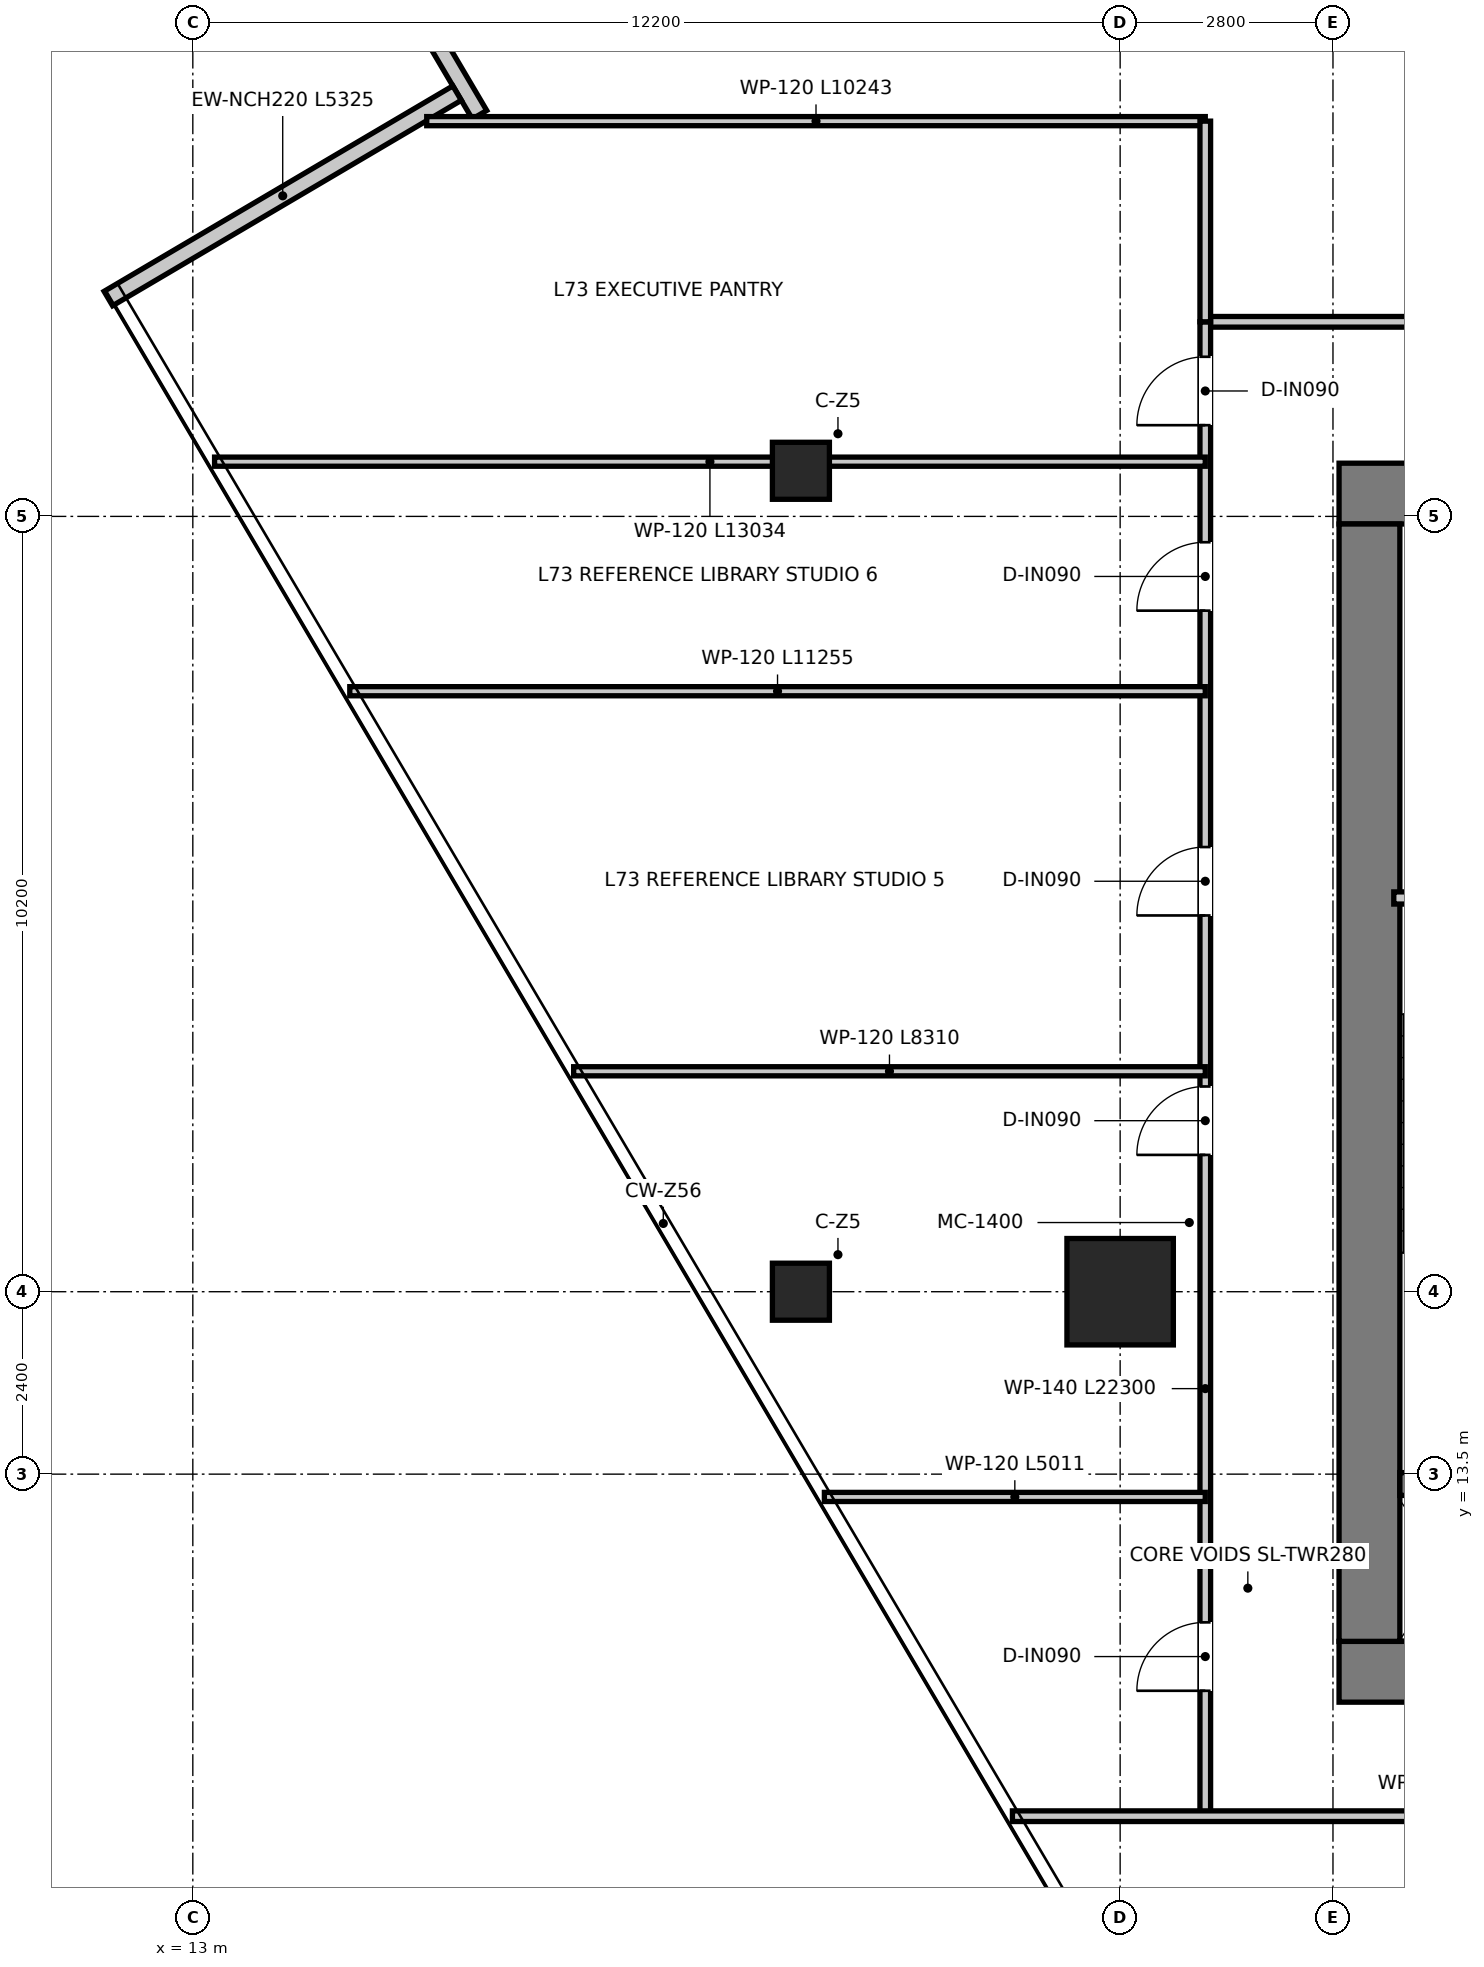
"""IFC4 building model, lengths in metres.
Left out: names, types, materials, properties, quantities, classifications, styles, units other than length and angle.
Written with IfcOpenShell. Run it as: python <this file> out.ifc"""

import sys

from ifc_helpers import new_model, si_unit, direction, frame, frame_2d, origin, origin_2d, place, context, subcontext, project, spatial, rectangle, extrude, source, transform, mapped, element, fill, save


model = new_model("IFC4")
c1 = context("Model", 3, precision=1e-05, world=origin(), true_north=direction((0.0, 1.0)))
c2 = subcontext(c1, "Body", "Model", "MODEL_VIEW")
j1 = project(units=[si_unit("LENGTHUNIT", "METRE"), si_unit("PLANEANGLEUNIT", "RADIAN")], contexts=[c1])
p1 = place(None, origin())
s1 = spatial("IfcSite", under=j1, at=p1, CompositionType="ELEMENT")
p2 = place(p1, origin())
s2 = spatial("IfcBuilding", under=s1, at=p2, CompositionType="ELEMENT")
p3 = place(p2, frame((0.0, 0.0, 299.0)))
s3 = spatial("IfcBuildingStorey", under=s2, at=p3, CompositionType="ELEMENT", Elevation=299.0)
p4 = place(p3, frame((28.08, 10.9, 0.0), z_axis=(0.0, 0.0, 1.0), x_axis=(1.0, 0.0, 0.0)))
e1 = element("IfcWall", 1, at=p4, inside=s3, PredefinedType="SHEAR", context=c2, shape_type="SweptSolid", body=[
    extrude(rectangle(XDim=15.84, YDim=0.8, at=frame_2d((7.92, 0.0))), origin(), (0.0, 0.0, 1.0), 3.95),
])
p5 = place(p3, frame((28.08, 26.4, 0.0), z_axis=(0.0, 0.0, 1.0), x_axis=(1.0, 0.0, 0.0)))
e2 = element("IfcWall", 2, at=p5, inside=s3, PredefinedType="SHEAR", context=c2, shape_type="SweptSolid", body=[
    extrude(rectangle(XDim=15.84, YDim=0.8, at=frame_2d((7.92, 0.0))), origin(), (0.0, 0.0, 1.0), 3.95),
])
p6 = place(p5, frame((7.22, 0.0, 0.0)))
e3 = element("IfcOpeningElement", 3, at=p6, cuts=e2, PredefinedType="OPENING", context=c2, shape_type="SweptSolid", body=[
    extrude(rectangle(XDim=1.4, YDim=2.2, at=frame_2d((0.7, 1.1))), frame((0.0, 0.41, 0.0), z_axis=(0.0, -1.0, 0.0), x_axis=(1.0, 0.0, 0.0)), (0.0, 0.0, 1.0), 0.82),
])
p7 = place(p5, frame((1.775, 0.0, 0.0)))
e4 = element("IfcOpeningElement", 4, at=p7, cuts=e2, PredefinedType="OPENING", context=c2, shape_type="SweptSolid", body=[
    extrude(rectangle(XDim=1.05, YDim=2.1, at=frame_2d((0.525, 1.05))), frame((0.0, 0.41, 0.0), z_axis=(0.0, -1.0, 0.0), x_axis=(1.0, 0.0, 0.0)), (0.0, 0.0, 1.0), 0.82),
])
p8 = place(p5, frame((13.015, 0.0, 0.0)))
e5 = element("IfcOpeningElement", 5, at=p8, cuts=e2, PredefinedType="OPENING", context=c2, shape_type="SweptSolid", body=[
    extrude(rectangle(XDim=1.05, YDim=2.1, at=frame_2d((0.525, 1.05))), frame((0.0, 0.41, 0.0), z_axis=(0.0, -1.0, 0.0), x_axis=(1.0, 0.0, 0.0)), (0.0, 0.0, 1.0), 0.82),
])
p9 = place(p3, frame((28.48, 11.3, 0.0), z_axis=(0.0, 0.0, 1.0), x_axis=(0.0, 1.0, 0.0)))
e6 = element("IfcWall", 6, at=p9, inside=s3, PredefinedType="SHEAR", context=c2, shape_type="SweptSolid", body=[
    extrude(rectangle(XDim=14.7, YDim=0.8, at=frame_2d((7.35, 0.0))), origin(), (0.0, 0.0, 1.0), 3.95),
])
p10 = place(p3, frame((28.88, 13.37, 0.0), z_axis=(0.0, 0.0, 1.0), x_axis=(1.0, 0.0, 0.0)))
e7 = element("IfcWall", 7, at=p10, inside=s3, PredefinedType="SHEAR", context=c2, shape_type="SweptSolid", body=[
    extrude(rectangle(XDim=3.1, YDim=0.3, at=frame_2d((1.55, 0.0))), origin(), (0.0, 0.0, 1.0), 3.95),
])
m1 = source(origin(), c2, "Body", "SweptSolid", [
    extrude(rectangle(XDim=1.4, YDim=1.4, at=origin_2d()), origin(), (0.0, 0.0, 1.0), 3.95),
])
p11 = place(p3, frame((25.2, 15.9, 0.0), z_axis=(0.0, 0.0, 1.0), x_axis=(1.0, 0.0, 0.0)))
e8 = element("IfcColumn", 8, at=p11, inside=s3, PredefinedType="USERDEFINED", context=c2, shape_type="MappedRepresentation", body=[
    mapped(m1, transform((0.0, 0.0, 0.0), x_axis=(1.0, 0.0, 0.0), y_axis=(0.0, 1.0, 0.0), z_axis=(0.0, 0.0, 1.0), scale=1.0)),
])
m2 = source(origin(), c2, "Body", "SweptSolid", [
    extrude(rectangle(XDim=0.75, YDim=0.75, at=origin_2d()), origin(), (0.0, 0.0, 1.0), 3.95),
])
for number, where, z_axis, x_axis in (
    (9, (21.0, 15.9, 0.0), (0.0, 0.0, 1.0), (1.0, 0.0, 0.0)),
    (10, (21.0, 26.7, 0.0), (0.0, 0.0, 1.0), (1.0, 0.0, 0.0)),
):
    element("IfcColumn", number, at=place(p3, frame(where, z_axis=z_axis, x_axis=x_axis)), inside=s3, PredefinedType="COLUMN", context=c2, shape_type="MappedRepresentation", body=[
        mapped(m2, transform((0.0, 0.0, 0.0), x_axis=(1.0, 0.0, 0.0), y_axis=(0.0, 1.0, 0.0), z_axis=(0.0, 0.0, 1.0), scale=1.0)),
    ])
p12 = place(p3, frame((13.813, 36.407, 0.0), z_axis=(0.0, 0.0, 1.0), x_axis=(0.507550761113, -0.861621857252, 0.0)))
e11 = element("IfcWall", 11, at=p12, inside=s3, PredefinedType="ELEMENTEDWALL", context=c2, shape_type="SweptSolid", body=[
    extrude(rectangle(XDim=5.83, YDim=0.22, at=frame_2d((2.915, 0.0))), origin(), (0.0, 0.0, 1.0), 3.67),
])
p13 = place(p3, frame((16.477, 31.669, 0.0), z_axis=(0.0, 0.0, 1.0), x_axis=(-0.861627616465, -0.507540984104, 0.0)))
e12 = element("IfcWall", 12, at=p13, inside=s3, PredefinedType="ELEMENTEDWALL", context=c2, shape_type="SweptSolid", body=[
    extrude(rectangle(XDim=5.325, YDim=0.22, at=frame_2d((2.663, 0.0))), origin(), (0.0, 0.0, 1.0), 3.67),
])
p14 = place(p3, frame((28.8, 21.08, 0.0), z_axis=(0.0, 0.0, 1.0), x_axis=(1.0, 0.0, 0.0)))
e13 = element("IfcWall", 13, at=p14, inside=s3, PredefinedType="PARTITIONING", context=c2, shape_type="SweptSolid", body=[
    extrude(rectangle(XDim=3.16, YDim=0.16, at=frame_2d((1.58, 0.0))), origin(), (0.0, 0.0, 1.0), 3.67),
])
p15 = place(p14, frame((1.055, 0.0, 0.0)))
e14 = element("IfcOpeningElement", 14, at=p15, cuts=e13, PredefinedType="OPENING", context=c2, shape_type="SweptSolid", body=[
    extrude(rectangle(XDim=1.05, YDim=2.1, at=frame_2d((0.525, 1.05))), frame((0.0, 0.09, 0.0), z_axis=(0.0, -1.0, 0.0), x_axis=(1.0, 0.0, 0.0)), (0.0, 0.0, 1.0), 0.18),
])
p16 = place(p3, frame((26.32, 28.66, 0.0), z_axis=(0.0, 0.0, 1.0), x_axis=(1.0, 0.0, 0.0)))
e15 = element("IfcWall", 15, at=p16, inside=s3, PredefinedType="PARTITIONING", context=c2, shape_type="SweptSolid", body=[
    extrude(rectangle(XDim=19.36, YDim=0.14, at=frame_2d((9.68, 0.0))), origin(), (0.0, 0.0, 1.0), 3.18),
])
p17 = place(p16, frame((4.265, 0.0, 0.0)))
e16 = element("IfcOpeningElement", 16, at=p17, cuts=e15, PredefinedType="OPENING", context=c2, shape_type="SweptSolid", body=[
    extrude(rectangle(XDim=0.95, YDim=2.1, at=frame_2d((0.475, 1.05))), frame((0.0, 0.08, 0.0), z_axis=(0.0, -1.0, 0.0), x_axis=(1.0, 0.0, 0.0)), (0.0, 0.0, 1.0), 0.16),
])
p18 = place(p16, frame((13.945, 0.0, 0.0)))
e17 = element("IfcOpeningElement", 17, at=p18, cuts=e15, PredefinedType="OPENING", context=c2, shape_type="SweptSolid", body=[
    extrude(rectangle(XDim=0.95, YDim=2.1, at=frame_2d((0.475, 1.05))), frame((0.0, 0.08, 0.0), z_axis=(0.0, -1.0, 0.0), x_axis=(1.0, 0.0, 0.0)), (0.0, 0.0, 1.0), 0.16),
])
p19 = place(p3, frame((26.32, 9.0, 0.0), z_axis=(0.0, 0.0, 1.0), x_axis=(0.0, 1.0, 0.0)))
e18 = element("IfcWall", 18, at=p19, inside=s3, PredefinedType="PARTITIONING", context=c2, shape_type="SweptSolid", body=[
    extrude(rectangle(XDim=19.66, YDim=0.14, at=frame_2d((9.83, 0.0))), origin(), (0.0, 0.0, 1.0), 3.13),
])
p20 = place(p19, frame((18.3, 0.0, 0.0)))
e19 = element("IfcOpeningElement", 19, at=p20, cuts=e18, PredefinedType="OPENING", context=c2, shape_type="SweptSolid", body=[
    extrude(rectangle(XDim=0.9, YDim=2.1, at=frame_2d((0.45, 1.05))), frame((0.0, 0.08, 0.0), z_axis=(0.0, -1.0, 0.0), x_axis=(1.0, 0.0, 0.0)), (0.0, 0.0, 1.0), 0.16),
])
p21 = place(p19, frame((1.65, 0.0, 0.0)))
e20 = element("IfcOpeningElement", 20, at=p21, cuts=e18, PredefinedType="OPENING", context=c2, shape_type="SweptSolid", body=[
    extrude(rectangle(XDim=0.9, YDim=2.1, at=frame_2d((0.45, 1.05))), frame((0.0, 0.08, 0.0), z_axis=(0.0, -1.0, 0.0), x_axis=(1.0, 0.0, 0.0)), (0.0, 0.0, 1.0), 0.16),
])
p22 = place(p19, frame((8.7, 0.0, 0.0)))
e21 = element("IfcOpeningElement", 21, at=p22, cuts=e18, PredefinedType="OPENING", context=c2, shape_type="SweptSolid", body=[
    extrude(rectangle(XDim=0.9, YDim=2.1, at=frame_2d((0.45, 1.05))), frame((0.0, 0.08, 0.0), z_axis=(0.0, -1.0, 0.0), x_axis=(1.0, 0.0, 0.0)), (0.0, 0.0, 1.0), 0.16),
])
p23 = place(p19, frame((11.85, 0.0, 0.0)))
e22 = element("IfcOpeningElement", 22, at=p23, cuts=e18, PredefinedType="OPENING", context=c2, shape_type="SweptSolid", body=[
    extrude(rectangle(XDim=0.9, YDim=2.1, at=frame_2d((0.45, 1.05))), frame((0.0, 0.08, 0.0), z_axis=(0.0, -1.0, 0.0), x_axis=(1.0, 0.0, 0.0)), (0.0, 0.0, 1.0), 0.16),
])
p24 = place(p19, frame((15.86, 0.0, 0.0)))
e23 = element("IfcOpeningElement", 23, at=p24, cuts=e18, PredefinedType="OPENING", context=c2, shape_type="SweptSolid", body=[
    extrude(rectangle(XDim=0.9, YDim=2.1, at=frame_2d((0.45, 1.05))), frame((0.0, 0.08, 0.0), z_axis=(0.0, -1.0, 0.0), x_axis=(1.0, 0.0, 0.0)), (0.0, 0.0, 1.0), 0.16),
])
p25 = place(p3, frame((23.783, 9.0, 0.0), z_axis=(0.0, 0.0, 1.0), x_axis=(1.0, 0.0, 0.0)))
e24 = element("IfcWall", 24, at=p25, inside=s3, PredefinedType="PARTITIONING", context=c2, shape_type="SweptSolid", body=[
    extrude(rectangle(XDim=20.609, YDim=0.14, at=frame_2d((10.304, 0.0))), origin(), (0.0, 0.0, 1.0), 3.67),
])
p26 = place(p25, frame((11.767, 0.0, 0.0)))
e25 = element("IfcOpeningElement", 25, at=p26, cuts=e24, PredefinedType="OPENING", context=c2, shape_type="SweptSolid", body=[
    extrude(rectangle(XDim=0.9, YDim=2.1, at=frame_2d((0.45, 1.05))), frame((0.0, 0.08, 0.0), z_axis=(0.0, -1.0, 0.0), x_axis=(1.0, 0.0, 0.0)), (0.0, 0.0, 1.0), 0.16),
])
p27 = place(p3, frame((13.286, 26.82, 0.0), z_axis=(0.0, 0.0, 1.0), x_axis=(1.0, 0.0, 0.0)))
e26 = element("IfcWall", 26, at=p27, inside=s3, PredefinedType="PARTITIONING", context=c2, shape_type="SweptSolid", body=[
    extrude(rectangle(XDim=13.034, YDim=0.12, at=frame_2d((6.517, 0.0))), origin(), (0.0, 0.0, 1.0), 3.13),
])
p28 = place(p3, frame((16.077, 31.3, 0.0), z_axis=(0.0, 0.0, 1.0), x_axis=(1.0, 0.0, 0.0)))
e27 = element("IfcWall", 27, at=p28, inside=s3, PredefinedType="PARTITIONING", context=c2, shape_type="SweptSolid", body=[
    extrude(rectangle(XDim=10.243, YDim=0.12, at=frame_2d((5.121, 0.0))), origin(), (0.0, 0.0, 1.0), 3.13),
])
p29 = place(p3, frame((26.32, 28.66, 0.0), z_axis=(0.0, 0.0, 1.0), x_axis=(0.0, 1.0, 0.0)))
e28 = element("IfcWall", 28, at=p29, inside=s3, PredefinedType="PARTITIONING", context=c2, shape_type="SweptSolid", body=[
    extrude(rectangle(XDim=2.64, YDim=0.14, at=frame_2d((1.32, 0.0))), origin(), (0.0, 0.0, 1.0), 3.43),
])
p30 = place(p3, frame((21.309, 13.2, 0.0), z_axis=(0.0, 0.0, 1.0), x_axis=(1.0, 0.0, 0.0)))
e29 = element("IfcWall", 29, at=p30, inside=s3, PredefinedType="PARTITIONING", context=c2, shape_type="SweptSolid", body=[
    extrude(rectangle(XDim=5.011, YDim=0.12, at=frame_2d((2.505, 0.0))), origin(), (0.0, 0.0, 1.0), 3.18),
])
p31 = place(p3, frame((18.01, 18.8, 0.0), z_axis=(0.0, 0.0, 1.0), x_axis=(1.0, 0.0, 0.0)))
e30 = element("IfcWall", 30, at=p31, inside=s3, PredefinedType="PARTITIONING", context=c2, shape_type="SweptSolid", body=[
    extrude(rectangle(XDim=8.31, YDim=0.12, at=frame_2d((4.155, 0.0))), origin(), (0.0, 0.0, 1.0), 3.13),
])
p32 = place(p3, frame((15.065, 23.8, 0.0), z_axis=(0.0, 0.0, 1.0), x_axis=(1.0, 0.0, 0.0)))
e31 = element("IfcWall", 31, at=p32, inside=s3, PredefinedType="PARTITIONING", context=c2, shape_type="SweptSolid", body=[
    extrude(rectangle(XDim=11.255, YDim=0.12, at=frame_2d((5.627, 0.0))), origin(), (0.0, 0.0, 1.0), 3.13),
])
p33 = place(p20, origin())
e32 = element("IfcDoor", 32, at=p33, inside=s3, OperationType="SINGLE_SWING_LEFT", PredefinedType="DOOR", context=c2, shape_type="SweptSolid", body=[
    extrude(rectangle(XDim=0.9, YDim=2.1, at=frame_2d((0.45, 1.05))), frame((0.0, 0.025, 0.0), z_axis=(0.0, -1.0, 0.0), x_axis=(1.0, 0.0, 0.0)), (0.0, 0.0, 1.0), 0.05),
])
fill(e19, e32)
p34 = place(p21, origin())
e33 = element("IfcDoor", 33, at=p34, inside=s3, OperationType="SINGLE_SWING_LEFT", PredefinedType="DOOR", context=c2, shape_type="SweptSolid", body=[
    extrude(rectangle(XDim=0.9, YDim=2.1, at=frame_2d((0.45, 1.05))), frame((0.0, 0.025, 0.0), z_axis=(0.0, -1.0, 0.0), x_axis=(1.0, 0.0, 0.0)), (0.0, 0.0, 1.0), 0.05),
])
fill(e20, e33)
p35 = place(p22, origin())
e34 = element("IfcDoor", 34, at=p35, inside=s3, OperationType="SINGLE_SWING_LEFT", PredefinedType="DOOR", context=c2, shape_type="SweptSolid", body=[
    extrude(rectangle(XDim=0.9, YDim=2.1, at=frame_2d((0.45, 1.05))), frame((0.0, 0.025, 0.0), z_axis=(0.0, -1.0, 0.0), x_axis=(1.0, 0.0, 0.0)), (0.0, 0.0, 1.0), 0.05),
])
fill(e21, e34)
p36 = place(p23, origin())
e35 = element("IfcDoor", 35, at=p36, inside=s3, OperationType="SINGLE_SWING_LEFT", PredefinedType="DOOR", context=c2, shape_type="SweptSolid", body=[
    extrude(rectangle(XDim=0.9, YDim=2.1, at=frame_2d((0.45, 1.05))), frame((0.0, 0.025, 0.0), z_axis=(0.0, -1.0, 0.0), x_axis=(1.0, 0.0, 0.0)), (0.0, 0.0, 1.0), 0.05),
])
fill(e22, e35)
p37 = place(p24, origin())
e36 = element("IfcDoor", 36, at=p37, inside=s3, OperationType="SINGLE_SWING_LEFT", PredefinedType="DOOR", context=c2, shape_type="SweptSolid", body=[
    extrude(rectangle(XDim=0.9, YDim=2.1, at=frame_2d((0.45, 1.05))), frame((0.0, 0.025, 0.0), z_axis=(0.0, -1.0, 0.0), x_axis=(1.0, 0.0, 0.0)), (0.0, 0.0, 1.0), 0.05),
])
fill(e23, e36)
save(model, sys.argv[1])
